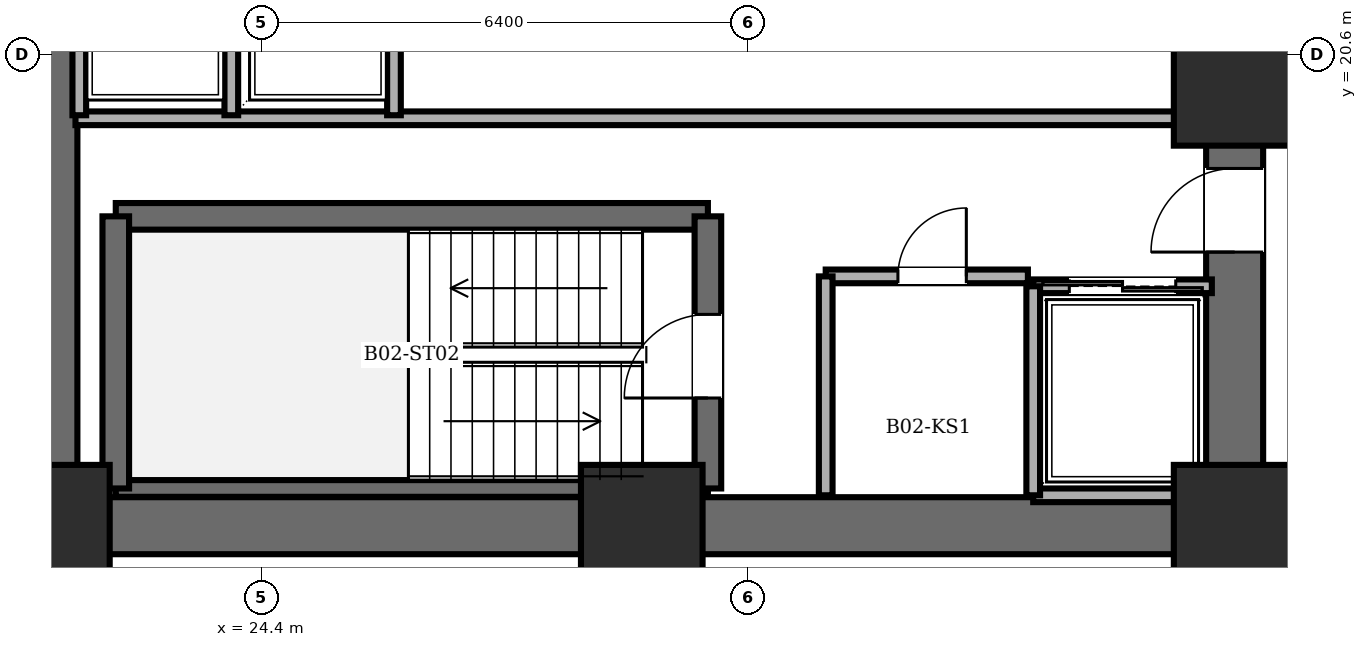
"""IFC4 building model, lengths in metres.
Left out: names, types, materials, properties, quantities, classifications, styles, units other than length and angle.
Written with IfcOpenShell. Run it as: python <this file> out.ifc"""

import sys

from ifc_helpers import new_model, si_unit, direction, frame, frame_2d, origin, origin_2d, place, context, subcontext, project, spatial, rectangle, extrude, element, fill, save


model = new_model("IFC4")
c1 = context("Model", 3, precision=1e-05, world=origin(), true_north=direction((0.0, 1.0)))
c2 = subcontext(c1, "Body", "Model", "MODEL_VIEW")
j1 = project(units=[si_unit("LENGTHUNIT", "METRE"), si_unit("PLANEANGLEUNIT", "RADIAN")], contexts=[c1])
p1 = place(None, origin())
s1 = spatial("IfcSite", under=j1, at=p1, CompositionType="ELEMENT")
p2 = place(p1, origin())
s2 = spatial("IfcBuilding", under=s1, at=p2, CompositionType="ELEMENT")
p3 = place(p2, frame((0.0, 0.0, -8.4)))
s3 = spatial("IfcBuildingStorey", under=s2, at=p3, CompositionType="ELEMENT", Elevation=-8.4)
for number, where, z_axis, x_axis in (
    (1, (21.6, 14.4, 0.0), (0.0, 0.0, 1.0), (1.0, 0.0, 0.0)),
    (2, (29.4, 14.4, 0.0), (0.0, 0.0, 1.0), (1.0, 0.0, 0.0)),
    (3, (37.2, 14.4, 0.0), (0.0, 0.0, 1.0), (1.0, 0.0, 0.0)),
    (4, (37.2, 20.2, 0.0), (0.0, 0.0, 1.0), (1.0, 0.0, 0.0)),
):
    element("IfcColumn", number, at=place(p3, frame(where, z_axis=z_axis, x_axis=x_axis)), inside=s3, PredefinedType="COLUMN", context=c2, shape_type="SweptSolid", body=[
        extrude(rectangle(XDim=1.6, YDim=1.6, at=origin_2d()), origin(), (0.0, 0.0, 1.0), 4.2),
    ])
p4 = place(p3, frame((21.6, 14.4, 0.0), z_axis=(0.0, 0.0, 1.0), x_axis=(0.0, 1.0, 0.0)))
e5 = element("IfcWall", 5, at=p4, inside=s3, PredefinedType="SHEAR", context=c2, shape_type="SweptSolid", body=[
    extrude(rectangle(XDim=19.2, YDim=0.75, at=frame_2d((9.6, 0.0))), origin(), (0.0, 0.0, 1.0), 3.95),
])
p5 = place(p3, frame((37.2, 14.4, 0.0), z_axis=(0.0, 0.0, 1.0), x_axis=(-1.0, 0.0, 0.0)))
e6 = element("IfcWall", 6, at=p5, inside=s3, PredefinedType="SHEAR", context=c2, shape_type="SweptSolid", body=[
    extrude(rectangle(XDim=15.6, YDim=0.75, at=frame_2d((7.8, 0.0))), origin(), (0.0, 0.0, 1.0), 3.95),
])
p6 = place(p3, frame((37.2, 14.4, 0.0), z_axis=(0.0, 0.0, 1.0), x_axis=(0.0, 1.0, 0.0)))
e7 = element("IfcWall", 7, at=p6, inside=s3, PredefinedType="SHEAR", context=c2, shape_type="SweptSolid", body=[
    extrude(rectangle(XDim=19.2, YDim=0.75, at=frame_2d((9.6, 0.0))), origin(), (0.0, 0.0, 1.0), 3.95),
])
p7 = place(p6, frame((15.8, 0.0, 0.0)))
e8 = element("IfcOpeningElement", 8, at=p7, cuts=e7, PredefinedType="OPENING", context=c2, shape_type="SweptSolid", body=[
    extrude(rectangle(XDim=1.15, YDim=2.15, at=frame_2d((0.575, 1.075))), frame((0.0, 0.385, 0.0), z_axis=(0.0, -1.0, 0.0), x_axis=(1.0, 0.0, 0.0)), (0.0, 0.0, 1.0), 0.77),
])
p8 = place(p6, frame((3.6, 0.0, 0.0)))
e9 = element("IfcOpeningElement", 9, at=p8, cuts=e7, PredefinedType="OPENING", context=c2, shape_type="SweptSolid", body=[
    extrude(rectangle(XDim=1.1, YDim=2.15, at=frame_2d((0.55, 1.075))), frame((0.0, 0.385, 0.0), z_axis=(0.0, -1.0, 0.0), x_axis=(1.0, 0.0, 0.0)), (0.0, 0.0, 1.0), 0.77),
])
p9 = place(p6, frame((8.6, 0.0, 0.0)))
e10 = element("IfcOpeningElement", 10, at=p9, cuts=e7, PredefinedType="OPENING", context=c2, shape_type="SweptSolid", body=[
    extrude(rectangle(XDim=1.3, YDim=2.2, at=frame_2d((0.65, 1.1))), frame((0.0, 0.385, 0.0), z_axis=(0.0, -1.0, 0.0), x_axis=(1.0, 0.0, 0.0)), (0.0, 0.0, 1.0), 0.77),
])
p10 = place(p3, frame((22.48, 18.47, 0.0), z_axis=(0.0, 0.0, 1.0), x_axis=(1.0, 0.0, 0.0)))
e11 = element("IfcWall", 11, at=p10, inside=s3, PredefinedType="SOLIDWALL", context=c2, shape_type="SweptSolid", body=[
    extrude(rectangle(XDim=7.79, YDim=0.35, at=frame_2d((3.895, 0.0))), origin(), (0.0, 0.0, 1.0), 3.95),
])
p11 = place(p3, frame((22.48, 14.89, 0.0), z_axis=(0.0, 0.0, 1.0), x_axis=(1.0, 0.0, 0.0)))
e12 = element("IfcWall", 12, at=p11, inside=s3, PredefinedType="PARTITIONING", context=c2, shape_type="SweptSolid", body=[
    extrude(rectangle(XDim=7.79, YDim=0.22, at=frame_2d((3.895, 0.0))), origin(), (0.0, 0.0, 1.0), 3.95),
])
p12 = place(p3, frame((22.48, 14.89, 0.0), z_axis=(0.0, 0.0, 1.0), x_axis=(0.0, 1.0, 0.0)))
e13 = element("IfcWall", 13, at=p12, inside=s3, PredefinedType="SOLIDWALL", context=c2, shape_type="SweptSolid", body=[
    extrude(rectangle(XDim=3.58, YDim=0.35, at=frame_2d((1.79, 0.0))), origin(), (0.0, 0.0, 1.0), 3.95),
])
p13 = place(p3, frame((30.27, 14.89, 0.0), z_axis=(0.0, 0.0, 1.0), x_axis=(0.0, 1.0, 0.0)))
e14 = element("IfcWall", 14, at=p13, inside=s3, PredefinedType="SOLIDWALL", context=c2, shape_type="SweptSolid", body=[
    extrude(rectangle(XDim=3.58, YDim=0.35, at=frame_2d((1.79, 0.0))), origin(), (0.0, 0.0, 1.0), 3.95),
])
p14 = place(p13, frame((1.19, 0.0, 0.0)))
e15 = element("IfcOpeningElement", 15, at=p14, cuts=e14, PredefinedType="OPENING", context=c2, shape_type="SweptSolid", body=[
    extrude(rectangle(XDim=1.1, YDim=2.15, at=frame_2d((0.55, 1.075))), frame((0.0, 0.185, 0.0), z_axis=(0.0, -1.0, 0.0), x_axis=(1.0, 0.0, 0.0)), (0.0, 0.0, 1.0), 0.37),
])
p15 = place(p3, frame((21.95, 19.76, 0.0), z_axis=(0.0, 0.0, 1.0), x_axis=(1.0, 0.0, 0.0)))
e16 = element("IfcWall", 16, at=p15, inside=s3, PredefinedType="PARTITIONING", context=c2, shape_type="SweptSolid", body=[
    extrude(rectangle(XDim=14.87, YDim=0.18, at=frame_2d((7.435, 0.0))), origin(), (0.0, 0.0, 1.0), 3.95),
])
p16 = place(p3, frame((31.82, 17.68, 0.0), z_axis=(0.0, 0.0, 1.0), x_axis=(1.0, 0.0, 0.0)))
e17 = element("IfcWall", 17, at=p16, inside=s3, PredefinedType="PARTITIONING", context=c2, shape_type="SweptSolid", body=[
    extrude(rectangle(XDim=2.66, YDim=0.18, at=frame_2d((1.33, 0.0))), origin(), (0.0, 0.0, 1.0), 3.95),
])
p17 = place(p16, frame((0.95, 0.0, 0.0)))
e18 = element("IfcOpeningElement", 18, at=p17, cuts=e17, PredefinedType="OPENING", context=c2, shape_type="SweptSolid", body=[
    extrude(rectangle(XDim=0.9, YDim=2.05, at=frame_2d((0.45, 1.025))), frame((0.0, 0.1, 0.0), z_axis=(0.0, -1.0, 0.0), x_axis=(1.0, 0.0, 0.0)), (0.0, 0.0, 1.0), 0.2),
])
p18 = place(p3, frame((31.82, 14.8, 0.0), z_axis=(0.0, 0.0, 1.0), x_axis=(0.0, 1.0, 0.0)))
e19 = element("IfcWall", 19, at=p18, inside=s3, PredefinedType="PARTITIONING", context=c2, shape_type="SweptSolid", body=[
    extrude(rectangle(XDim=2.88, YDim=0.18, at=frame_2d((1.44, 0.0))), origin(), (0.0, 0.0, 1.0), 3.95),
])
p19 = place(p3, frame((34.55, 17.55, 0.0), z_axis=(0.0, 0.0, 1.0), x_axis=(1.0, 0.0, 0.0)))
e20 = element("IfcWall", 20, at=p19, inside=s3, PredefinedType="PARTITIONING", context=c2, shape_type="SweptSolid", body=[
    extrude(rectangle(XDim=2.35, YDim=0.18, at=frame_2d((1.175, 0.0))), origin(), (0.0, 0.0, 1.0), 3.95),
])
p20 = place(p19, frame((0.475, 0.0, 0.0)))
e21 = element("IfcOpeningElement", 21, at=p20, cuts=e20, PredefinedType="OPENING", context=c2, shape_type="SweptSolid", body=[
    extrude(rectangle(XDim=1.4, YDim=2.3, at=frame_2d((0.7, 1.15))), frame((0.0, 0.1, 0.0), z_axis=(0.0, -1.0, 0.0), x_axis=(1.0, 0.0, 0.0)), (0.0, 0.0, 1.0), 0.2),
])
p21 = place(p3, frame((36.9, 14.8, 0.0), z_axis=(0.0, 0.0, 1.0), x_axis=(-1.0, 0.0, 0.0)))
e22 = element("IfcWall", 22, at=p21, inside=s3, PredefinedType="PARTITIONING", context=c2, shape_type="SweptSolid", body=[
    extrude(rectangle(XDim=2.35, YDim=0.18, at=frame_2d((1.175, 0.0))), origin(), (0.0, 0.0, 1.0), 3.95),
])
p22 = place(p3, frame((34.55, 17.55, 0.0), z_axis=(0.0, 0.0, 1.0), x_axis=(0.0, -1.0, 0.0)))
e23 = element("IfcWall", 23, at=p22, inside=s3, PredefinedType="PARTITIONING", context=c2, shape_type="SweptSolid", body=[
    extrude(rectangle(XDim=2.75, YDim=0.18, at=frame_2d((1.375, 0.0))), origin(), (0.0, 0.0, 1.0), 3.95),
])
for number, where, z_axis, x_axis in (
    (24, (24.0, 19.8, 0.0), (0.0, 0.0, 1.0), (0.0, 1.0, 0.0)),
    (25, (22.0, 22.3, 0.0), (0.0, 0.0, 1.0), (0.0, -1.0, 0.0)),
    (26, (26.14, 19.8, 0.0), (0.0, 0.0, 1.0), (0.0, 1.0, 0.0)),
):
    element("IfcWall", number, at=place(p3, frame(where, z_axis=z_axis, x_axis=x_axis)), inside=s3, PredefinedType="PARTITIONING", context=c2, shape_type="SweptSolid", body=[
        extrude(rectangle(XDim=2.5, YDim=0.18, at=frame_2d((1.25, 0.0))), origin(), (0.0, 0.0, 1.0), 3.95),
    ])
p23 = place(p14, origin())
e27 = element("IfcDoor", 27, at=p23, inside=s3, OperationType="SINGLE_SWING_LEFT", PredefinedType="DOOR", context=c2, shape_type="SweptSolid", body=[
    extrude(rectangle(XDim=1.1, YDim=2.15, at=frame_2d((0.55, 1.075))), frame((0.0, 0.025, 0.0), z_axis=(0.0, -1.0, 0.0), x_axis=(1.0, 0.0, 0.0)), (0.0, 0.0, 1.0), 0.05),
])
fill(e15, e27)
p24 = place(p8, origin())
e28 = element("IfcDoor", 28, at=p24, inside=s3, OperationType="SINGLE_SWING_LEFT", PredefinedType="DOOR", context=c2, shape_type="SweptSolid", body=[
    extrude(rectangle(XDim=1.1, YDim=2.15, at=frame_2d((0.55, 1.075))), frame((0.0, 0.025, 0.0), z_axis=(0.0, -1.0, 0.0), x_axis=(1.0, 0.0, 0.0)), (0.0, 0.0, 1.0), 0.05),
])
fill(e9, e28)
p25 = place(p17, origin())
e29 = element("IfcDoor", 29, at=p25, inside=s3, OperationType="SINGLE_SWING_RIGHT", PredefinedType="DOOR", context=c2, shape_type="SweptSolid", body=[
    extrude(rectangle(XDim=0.9, YDim=2.05, at=frame_2d((0.45, 1.025))), frame((0.0, 0.025, 0.0), z_axis=(0.0, -1.0, 0.0), x_axis=(1.0, 0.0, 0.0)), (0.0, 0.0, 1.0), 0.05),
])
fill(e18, e29)
p26 = place(p20, origin())
e30 = element("IfcDoor", 30, at=p26, inside=s3, OperationType="DOUBLE_DOOR_SLIDING", PredefinedType="DOOR", context=c2, shape_type="SweptSolid", body=[
    extrude(rectangle(XDim=1.4, YDim=2.3, at=frame_2d((0.7, 1.15))), frame((0.0, 0.025, 0.0), z_axis=(0.0, -1.0, 0.0), x_axis=(1.0, 0.0, 0.0)), (0.0, 0.0, 1.0), 0.05),
])
fill(e21, e30)
save(model, sys.argv[1])
